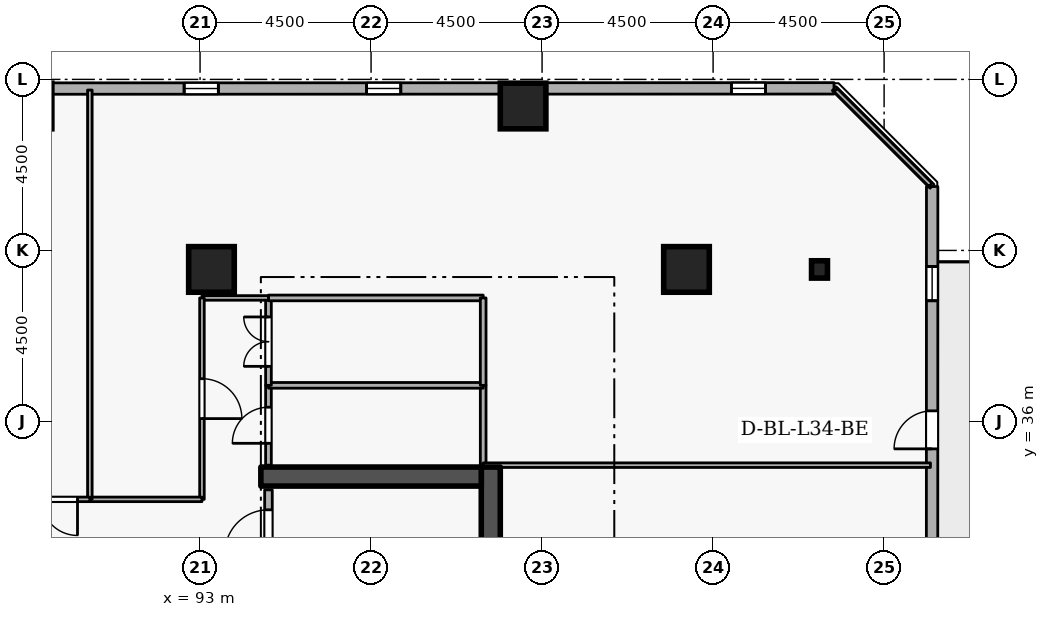
"""IFC4 building model, lengths in metres.
Left out: names, types, materials, properties, quantities, classifications, styles, units other than length and angle.
Written with IfcOpenShell. Run it as: python <this file> out.ifc"""

import sys

from ifc_helpers import new_model, si_unit, direction, frame, frame_2d, origin, origin_2d, place, context, subcontext, project, spatial, rectangle, i_section, extrude, element, fill, save


model = new_model("IFC4")
c1 = context("Model", 3, precision=1e-05, world=origin(), true_north=direction((0.0, 1.0)))
c2 = subcontext(c1, "Body", "Model", "MODEL_VIEW")
j1 = project(units=[si_unit("LENGTHUNIT", "METRE"), si_unit("PLANEANGLEUNIT", "RADIAN")], contexts=[c1])
p1 = place(None, origin())
s1 = spatial("IfcSite", under=j1, at=p1, CompositionType="ELEMENT")
p2 = place(p1, origin())
s2 = spatial("IfcBuilding", under=s1, at=p2, CompositionType="ELEMENT")
p3 = place(p2, frame((0.0, 0.0, 130.5)))
s3 = spatial("IfcBuildingStorey", under=s2, at=p3, CompositionType="ELEMENT", Elevation=130.5)
p4 = place(p3, frame((100.65, 19.2, 0.0), z_axis=(0.0, 0.0, 1.0), x_axis=(0.0, 1.0, 0.0)))
e1 = element("IfcWall", 1, at=p4, inside=s3, PredefinedType="SHEAR", context=c2, shape_type="SweptSolid", body=[
    extrude(rectangle(XDim=15.6, YDim=0.5, at=frame_2d((7.8, 0.0))), origin(), (0.0, 0.0, 1.0), 3.6),
])
p5 = place(p3, frame((94.6, 34.55, 0.0), z_axis=(0.0, 0.0, 1.0), x_axis=(1.0, 0.0, 0.0)))
e2 = element("IfcWall", 2, at=p5, inside=s3, PredefinedType="SHEAR", context=c2, shape_type="SweptSolid", body=[
    extrude(rectangle(XDim=5.8, YDim=0.5, at=frame_2d((2.9, 0.0))), origin(), (0.0, 0.0, 1.0), 3.6),
])
for number, where, z_axis, x_axis in (
    (3, (105.8, 40.0, 0.0), (0.0, 0.0, 1.0), (1.0, 0.0, 0.0)),
    (4, (101.5, 44.3, 0.0), (0.0, 0.0, 1.0), (1.0, 0.0, 0.0)),
    (5, (93.3, 40.0, 0.0), (0.0, 0.0, 1.0), (1.0, 0.0, 0.0)),
):
    element("IfcColumn", number, at=place(p3, frame(where, z_axis=z_axis, x_axis=x_axis)), inside=s3, PredefinedType="COLUMN", context=c2, shape_type="SweptSolid", body=[
        extrude(rectangle(XDim=1.2, YDim=1.2, at=origin_2d()), origin(), (0.0, 0.0, 1.0), 3.6),
    ])
p6 = place(p3, frame((109.3, 40.0, 0.0), z_axis=(0.0, 0.0, 1.0), x_axis=(1.0, 0.0, 0.0)))
e6 = element("IfcColumn", 6, at=p6, inside=s3, PredefinedType="COLUMN", context=c2, shape_type="SweptSolid", body=[
    extrude(i_section(OverallWidth=0.418, OverallDepth=0.456, WebThickness=0.042, FlangeThickness=0.067, FilletRadius=0.015, at=origin_2d()), origin(), (0.0, 0.0, 1.0), 3.6),
])
p7 = place(p3, frame((112.256, 8.576, 0.0), z_axis=(0.0, 0.0, 1.0), x_axis=(0.000268805477, 0.999999963872, 0.0)))
e7 = element("IfcWall", 7, at=p7, inside=s3, PredefinedType="STANDARD", context=c2, shape_type="SweptSolid", body=[
    extrude(rectangle(XDim=33.605, YDim=0.3, at=frame_2d((16.802, 0.0))), origin(), (0.0, 0.0, 1.0), 2.7),
])
p8 = place(p7, frame((26.702, 0.0, 0.0)))
e8 = element("IfcOpeningElement", 8, at=p8, cuts=e7, PredefinedType="OPENING", context=c2, shape_type="SweptSolid", body=[
    extrude(rectangle(XDim=1.0, YDim=2.08, at=frame_2d((0.5, 1.04))), frame((0.0, 0.16, 0.0), z_axis=(0.0, -1.0, 0.0), x_axis=(1.0, 0.0, 0.0)), (0.0, 0.0, 1.0), 0.32),
])
p9 = place(p7, frame((1.8, 0.0, 0.72)))
e9 = element("IfcOpeningElement", 9, at=p9, cuts=e7, PredefinedType="OPENING", context=c2, shape_type="SweptSolid", body=[
    extrude(rectangle(XDim=0.9, YDim=1.75, at=frame_2d((0.45, 0.875))), frame((0.0, 0.16, 0.0), z_axis=(0.0, -1.0, 0.0), x_axis=(1.0, 0.0, 0.0)), (0.0, 0.0, 1.0), 0.32),
])
p10 = place(p7, frame((6.6, 0.0, 0.72)))
e10 = element("IfcOpeningElement", 10, at=p10, cuts=e7, PredefinedType="OPENING", context=c2, shape_type="SweptSolid", body=[
    extrude(rectangle(XDim=0.9, YDim=1.75, at=frame_2d((0.45, 0.875))), frame((0.0, 0.16, 0.0), z_axis=(0.0, -1.0, 0.0), x_axis=(1.0, 0.0, 0.0)), (0.0, 0.0, 1.0), 0.32),
])
p11 = place(p7, frame((11.4, 0.0, 0.72)))
e11 = element("IfcOpeningElement", 11, at=p11, cuts=e7, PredefinedType="OPENING", context=c2, shape_type="SweptSolid", body=[
    extrude(rectangle(XDim=0.9, YDim=1.75, at=frame_2d((0.45, 0.875))), frame((0.0, 0.16, 0.0), z_axis=(0.0, -1.0, 0.0), x_axis=(1.0, 0.0, 0.0)), (0.0, 0.0, 1.0), 0.32),
])
p12 = place(p7, frame((16.2, 0.0, 0.72)))
e12 = element("IfcOpeningElement", 12, at=p12, cuts=e7, PredefinedType="OPENING", context=c2, shape_type="SweptSolid", body=[
    extrude(rectangle(XDim=0.9, YDim=1.75, at=frame_2d((0.45, 0.875))), frame((0.0, 0.16, 0.0), z_axis=(0.0, -1.0, 0.0), x_axis=(1.0, 0.0, 0.0)), (0.0, 0.0, 1.0), 0.32),
])
p13 = place(p7, frame((21.0, 0.0, 0.72)))
e13 = element("IfcOpeningElement", 13, at=p13, cuts=e7, PredefinedType="OPENING", context=c2, shape_type="SweptSolid", body=[
    extrude(rectangle(XDim=0.9, YDim=1.75, at=frame_2d((0.45, 0.875))), frame((0.0, 0.16, 0.0), z_axis=(0.0, -1.0, 0.0), x_axis=(1.0, 0.0, 0.0)), (0.0, 0.0, 1.0), 0.32),
])
p14 = place(p7, frame((30.6, 0.0, 0.72)))
e14 = element("IfcOpeningElement", 14, at=p14, cuts=e7, PredefinedType="OPENING", context=c2, shape_type="SweptSolid", body=[
    extrude(rectangle(XDim=0.9, YDim=1.75, at=frame_2d((0.45, 0.875))), frame((0.0, 0.16, 0.0), z_axis=(0.0, -1.0, 0.0), x_axis=(1.0, 0.0, 0.0)), (0.0, 0.0, 1.0), 0.32),
])
p15 = place(p3, frame((109.681, 44.765, 0.0), z_axis=(0.0, 0.0, 1.0), x_axis=(-0.999999963872, -0.000268805477, 0.0)))
e15 = element("IfcWall", 15, at=p15, inside=s3, PredefinedType="STANDARD", context=c2, shape_type="SweptSolid", body=[
    extrude(rectangle(XDim=33.605, YDim=0.3, at=frame_2d((16.802, 0.0))), origin(), (0.0, 0.0, 1.0), 2.7),
])
p16 = place(p15, frame((1.8, 0.0, 0.72)))
e16 = element("IfcOpeningElement", 16, at=p16, cuts=e15, PredefinedType="OPENING", context=c2, shape_type="SweptSolid", body=[
    extrude(rectangle(XDim=0.9, YDim=1.75, at=frame_2d((0.45, 0.875))), frame((0.0, 0.16, 0.0), z_axis=(0.0, -1.0, 0.0), x_axis=(1.0, 0.0, 0.0)), (0.0, 0.0, 1.0), 0.32),
])
p17 = place(p15, frame((11.4, 0.0, 0.72)))
e17 = element("IfcOpeningElement", 17, at=p17, cuts=e15, PredefinedType="OPENING", context=c2, shape_type="SweptSolid", body=[
    extrude(rectangle(XDim=0.9, YDim=1.75, at=frame_2d((0.45, 0.875))), frame((0.0, 0.16, 0.0), z_axis=(0.0, -1.0, 0.0), x_axis=(1.0, 0.0, 0.0)), (0.0, 0.0, 1.0), 0.32),
])
p18 = place(p15, frame((16.2, 0.0, 0.72)))
e18 = element("IfcOpeningElement", 18, at=p18, cuts=e15, PredefinedType="OPENING", context=c2, shape_type="SweptSolid", body=[
    extrude(rectangle(XDim=0.9, YDim=1.75, at=frame_2d((0.45, 0.875))), frame((0.0, 0.16, 0.0), z_axis=(0.0, -1.0, 0.0), x_axis=(1.0, 0.0, 0.0)), (0.0, 0.0, 1.0), 0.32),
])
p19 = place(p15, frame((25.8, 0.0, 0.72)))
e19 = element("IfcOpeningElement", 19, at=p19, cuts=e15, PredefinedType="OPENING", context=c2, shape_type="SweptSolid", body=[
    extrude(rectangle(XDim=0.9, YDim=1.75, at=frame_2d((0.45, 0.875))), frame((0.0, 0.16, 0.0), z_axis=(0.0, -1.0, 0.0), x_axis=(1.0, 0.0, 0.0)), (0.0, 0.0, 1.0), 0.32),
])
p20 = place(p15, frame((30.6, 0.0, 0.72)))
e20 = element("IfcOpeningElement", 20, at=p20, cuts=e15, PredefinedType="OPENING", context=c2, shape_type="SweptSolid", body=[
    extrude(rectangle(XDim=0.9, YDim=1.75, at=frame_2d((0.45, 0.875))), frame((0.0, 0.16, 0.0), z_axis=(0.0, -1.0, 0.0), x_axis=(1.0, 0.0, 0.0)), (0.0, 0.0, 1.0), 0.32),
])
p21 = place(p3, frame((94.8, 32.0, 0.0), z_axis=(0.0, 0.0, 1.0), x_axis=(0.0, 1.0, 0.0)))
e21 = element("IfcWall", 21, at=p21, inside=s3, PredefinedType="STANDARD", context=c2, shape_type="SweptSolid", body=[
    extrude(rectangle(XDim=2.2, YDim=0.2, at=frame_2d((1.1, 0.0))), origin(), (0.0, 0.0, 1.0), 3.34),
])
p22 = place(p21, frame((0.525, 0.0, 0.0)))
e22 = element("IfcOpeningElement", 22, at=p22, cuts=e21, PredefinedType="OPENING", context=c2, shape_type="SweptSolid", body=[
    extrude(rectangle(XDim=1.15, YDim=2.1, at=frame_2d((0.575, 1.05))), frame((0.0, 0.11, 0.0), z_axis=(0.0, -1.0, 0.0), x_axis=(1.0, 0.0, 0.0)), (0.0, 0.0, 1.0), 0.22),
])
p23 = place(p3, frame((100.45, 36.95, 0.0), z_axis=(0.0, 0.0, 1.0), x_axis=(0.0, -1.0, 0.0)))
e23 = element("IfcWall", 23, at=p23, inside=s3, PredefinedType="PARTITIONING", context=c2, shape_type="SweptSolid", body=[
    extrude(rectangle(XDim=2.1, YDim=0.15, at=frame_2d((1.05, 0.0))), origin(), (0.0, 0.0, 1.0), 3.34),
])
p24 = place(p3, frame((94.8, 34.85, 0.0), z_axis=(0.0, 0.0, 1.0), x_axis=(0.0, 1.0, 0.0)))
e24 = element("IfcWall", 24, at=p24, inside=s3, PredefinedType="PARTITIONING", context=c2, shape_type="SweptSolid", body=[
    extrude(rectangle(XDim=2.1, YDim=0.15, at=frame_2d((1.05, 0.0))), origin(), (0.0, 0.0, 1.0), 3.34),
])
p25 = place(p24, frame((0.575, 0.0, 0.0)))
e25 = element("IfcOpeningElement", 25, at=p25, cuts=e24, PredefinedType="OPENING", context=c2, shape_type="SweptSolid", body=[
    extrude(rectangle(XDim=0.95, YDim=2.1, at=frame_2d((0.475, 1.05))), frame((0.0, 0.085, 0.0), z_axis=(0.0, -1.0, 0.0), x_axis=(1.0, 0.0, 0.0)), (0.0, 0.0, 1.0), 0.17),
])
p26 = place(p3, frame((94.8, 36.95, 0.0), z_axis=(0.0, 0.0, 1.0), x_axis=(1.0, 0.0, 0.0)))
e26 = element("IfcWall", 26, at=p26, inside=s3, PredefinedType="PARTITIONING", context=c2, shape_type="SweptSolid", body=[
    extrude(rectangle(XDim=5.65, YDim=0.15, at=frame_2d((2.825, 0.0))), origin(), (0.0, 0.0, 1.0), 3.34),
])
p27 = place(p3, frame((94.8, 36.95, 0.0), z_axis=(0.0, 0.0, 1.0), x_axis=(0.0, 1.0, 0.0)))
e27 = element("IfcWall", 27, at=p27, inside=s3, PredefinedType="PARTITIONING", context=c2, shape_type="SweptSolid", body=[
    extrude(rectangle(XDim=2.3, YDim=0.15, at=frame_2d((1.15, 0.0))), origin(), (0.0, 0.0, 1.0), 3.34),
])
p28 = place(p27, frame((0.5, 0.0, 0.0)))
e28 = element("IfcOpeningElement", 28, at=p28, cuts=e27, PredefinedType="OPENING", context=c2, shape_type="SweptSolid", body=[
    extrude(rectangle(XDim=1.3, YDim=2.12, at=frame_2d((0.65, 1.06))), frame((0.0, 0.085, 0.0), z_axis=(0.0, -1.0, 0.0), x_axis=(1.0, 0.0, 0.0)), (0.0, 0.0, 1.0), 0.17),
])
p29 = place(p3, frame((94.8, 39.25, 0.0), z_axis=(0.0, 0.0, 1.0), x_axis=(1.0, 0.0, 0.0)))
e29 = element("IfcWall", 29, at=p29, inside=s3, PredefinedType="PARTITIONING", context=c2, shape_type="SweptSolid", body=[
    extrude(rectangle(XDim=5.65, YDim=0.15, at=frame_2d((2.825, 0.0))), origin(), (0.0, 0.0, 1.0), 3.34),
])
p30 = place(p3, frame((100.45, 39.25, 0.0), z_axis=(0.0, 0.0, 1.0), x_axis=(0.0, -1.0, 0.0)))
e30 = element("IfcWall", 30, at=p30, inside=s3, PredefinedType="PARTITIONING", context=c2, shape_type="SweptSolid", body=[
    extrude(rectangle(XDim=2.3, YDim=0.15, at=frame_2d((1.15, 0.0))), origin(), (0.0, 0.0, 1.0), 3.34),
])
p31 = place(p3, frame((94.8, 39.25, 0.0), z_axis=(0.0, 0.0, 1.0), x_axis=(-1.0, 0.0, 0.0)))
e31 = element("IfcWall", 31, at=p31, inside=s3, PredefinedType="PARTITIONING", context=c2, shape_type="SweptSolid", body=[
    extrude(rectangle(XDim=1.75, YDim=0.12, at=frame_2d((0.875, 0.0))), origin(), (0.0, 0.0, 1.0), 3.34),
])
p32 = place(p3, frame((93.05, 39.25, 0.0), z_axis=(0.0, 0.0, 1.0), x_axis=(0.0, -1.0, 0.0)))
e32 = element("IfcWall", 32, at=p32, inside=s3, PredefinedType="PARTITIONING", context=c2, shape_type="SweptSolid", body=[
    extrude(rectangle(XDim=5.3, YDim=0.12, at=frame_2d((2.65, 0.0))), origin(), (0.0, 0.0, 1.0), 3.34),
])
p33 = place(p32, frame((2.125, 0.0, 0.0)))
e33 = element("IfcOpeningElement", 33, at=p33, cuts=e32, PredefinedType="OPENING", context=c2, shape_type="SweptSolid", body=[
    extrude(rectangle(XDim=1.05, YDim=2.1, at=frame_2d((0.525, 1.05))), frame((0.0, 0.07, 0.0), z_axis=(0.0, -1.0, 0.0), x_axis=(1.0, 0.0, 0.0)), (0.0, 0.0, 1.0), 0.14),
])
p34 = place(p3, frame((93.05, 33.95, 0.0), z_axis=(0.0, 0.0, 1.0), x_axis=(-1.0, 0.0, 0.0)))
e34 = element("IfcWall", 34, at=p34, inside=s3, PredefinedType="PARTITIONING", context=c2, shape_type="SweptSolid", body=[
    extrude(rectangle(XDim=2.95, YDim=0.12, at=frame_2d((1.475, 0.0))), origin(), (0.0, 0.0, 1.0), 3.34),
])
p35 = place(p3, frame((90.1, 33.95, 0.0), z_axis=(0.0, 0.0, 1.0), x_axis=(0.0, 1.0, 0.0)))
e35 = element("IfcWall", 35, at=p35, inside=s3, PredefinedType="PARTITIONING", context=c2, shape_type="SweptSolid", body=[
    extrude(rectangle(XDim=10.77, YDim=0.12, at=frame_2d((5.385, 0.0))), origin(), (0.0, 0.0, 1.0), 3.34),
])
p36 = place(p3, frame((109.725, 44.72, 0.0), z_axis=(0.0, 0.0, 1.0), x_axis=(0.707106781187, -0.707106781187, 0.0)))
e36 = element("IfcWall", 36, at=p36, inside=s3, PredefinedType="PARTITIONING", context=c2, shape_type="SweptSolid", body=[
    extrude(rectangle(XDim=3.528, YDim=0.12, at=frame_2d((1.764, 0.0))), origin(), (0.0, 0.0, 1.0), 3.34),
])
p37 = place(p3, frame((112.22, 34.85, 0.0), z_axis=(0.0, 0.0, 1.0), x_axis=(-1.0, 0.0, 0.0)))
e37 = element("IfcWall", 37, at=p37, inside=s3, PredefinedType="PARTITIONING", context=c2, shape_type="SweptSolid", body=[
    extrude(rectangle(XDim=11.77, YDim=0.12, at=frame_2d((5.885, 0.0))), origin(), (0.0, 0.0, 1.0), 2.545),
])
p38 = place(p3, frame((90.1, 33.95, 0.0), z_axis=(0.0, 0.0, 1.0), x_axis=(-1.0, 0.0, 0.0)))
e38 = element("IfcWall", 38, at=p38, inside=s3, PredefinedType="PARTITIONING", context=c2, shape_type="SweptSolid", body=[
    extrude(rectangle(XDim=1.6, YDim=0.12, at=frame_2d((0.8, 0.0))), origin(), (0.0, 0.0, 1.0), 3.34),
])
p39 = place(p38, frame((0.325, 0.0, 0.0)))
e39 = element("IfcOpeningElement", 39, at=p39, cuts=e38, PredefinedType="OPENING", context=c2, shape_type="SweptSolid", body=[
    extrude(rectangle(XDim=0.95, YDim=2.1, at=frame_2d((0.475, 1.05))), frame((0.0, 0.07, 0.0), z_axis=(0.0, -1.0, 0.0), x_axis=(1.0, 0.0, 0.0)), (0.0, 0.0, 1.0), 0.14),
])
p40 = place(p8, origin())
e40 = element("IfcDoor", 40, at=p40, inside=s3, OperationType="SINGLE_SWING_LEFT", PredefinedType="DOOR", context=c2, shape_type="SweptSolid", body=[
    extrude(rectangle(XDim=1.0, YDim=2.08, at=frame_2d((0.5, 1.04))), frame((0.0, 0.025, 0.0), z_axis=(0.0, -1.0, 0.0), x_axis=(1.0, 0.0, 0.0)), (0.0, 0.0, 1.0), 0.05),
])
fill(e8, e40)
p41 = place(p14, origin())
e41 = element("IfcWindow", 41, at=p41, inside=s3, PartitioningType="SINGLE_PANEL", PredefinedType="WINDOW", context=c2, shape_type="SweptSolid", body=[
    extrude(rectangle(XDim=0.9, YDim=1.75, at=frame_2d((0.45, 0.875))), frame((0.0, 0.03, 0.0), z_axis=(0.0, -1.0, 0.0), x_axis=(1.0, 0.0, 0.0)), (0.0, 0.0, 1.0), 0.06),
])
fill(e14, e41)
p42 = place(p16, origin())
e42 = element("IfcWindow", 42, at=p42, inside=s3, PartitioningType="SINGLE_PANEL", PredefinedType="WINDOW", context=c2, shape_type="SweptSolid", body=[
    extrude(rectangle(XDim=0.9, YDim=1.75, at=frame_2d((0.45, 0.875))), frame((0.0, 0.03, 0.0), z_axis=(0.0, -1.0, 0.0), x_axis=(1.0, 0.0, 0.0)), (0.0, 0.0, 1.0), 0.06),
])
fill(e16, e42)
p43 = place(p17, origin())
e43 = element("IfcWindow", 43, at=p43, inside=s3, PartitioningType="SINGLE_PANEL", PredefinedType="WINDOW", context=c2, shape_type="SweptSolid", body=[
    extrude(rectangle(XDim=0.9, YDim=1.75, at=frame_2d((0.45, 0.875))), frame((0.0, 0.03, 0.0), z_axis=(0.0, -1.0, 0.0), x_axis=(1.0, 0.0, 0.0)), (0.0, 0.0, 1.0), 0.06),
])
fill(e17, e43)
p44 = place(p18, origin())
e44 = element("IfcWindow", 44, at=p44, inside=s3, PartitioningType="SINGLE_PANEL", PredefinedType="WINDOW", context=c2, shape_type="SweptSolid", body=[
    extrude(rectangle(XDim=0.9, YDim=1.75, at=frame_2d((0.45, 0.875))), frame((0.0, 0.03, 0.0), z_axis=(0.0, -1.0, 0.0), x_axis=(1.0, 0.0, 0.0)), (0.0, 0.0, 1.0), 0.06),
])
fill(e18, e44)
p45 = place(p22, origin())
e45 = element("IfcDoor", 45, at=p45, inside=s3, OperationType="SINGLE_SWING_LEFT", PredefinedType="DOOR", context=c2, shape_type="SweptSolid", body=[
    extrude(rectangle(XDim=1.15, YDim=2.1, at=frame_2d((0.575, 1.05))), frame((0.0, 0.025, 0.0), z_axis=(0.0, -1.0, 0.0), x_axis=(1.0, 0.0, 0.0)), (0.0, 0.0, 1.0), 0.05),
])
fill(e22, e45)
p46 = place(p25, origin())
e46 = element("IfcDoor", 46, at=p46, inside=s3, OperationType="SINGLE_SWING_LEFT", PredefinedType="DOOR", context=c2, shape_type="SweptSolid", body=[
    extrude(rectangle(XDim=0.95, YDim=2.1, at=frame_2d((0.475, 1.05))), frame((0.0, 0.025, 0.0), z_axis=(0.0, -1.0, 0.0), x_axis=(1.0, 0.0, 0.0)), (0.0, 0.0, 1.0), 0.05),
])
fill(e25, e46)
p47 = place(p28, origin())
e47 = element("IfcDoor", 47, at=p47, inside=s3, OperationType="DOUBLE_DOOR_SINGLE_SWING", PredefinedType="DOOR", context=c2, shape_type="SweptSolid", body=[
    extrude(rectangle(XDim=1.3, YDim=2.12, at=frame_2d((0.65, 1.06))), frame((0.0, 0.025, 0.0), z_axis=(0.0, -1.0, 0.0), x_axis=(1.0, 0.0, 0.0)), (0.0, 0.0, 1.0), 0.05),
])
fill(e28, e47)
p48 = place(p33, origin())
e48 = element("IfcDoor", 48, at=p48, inside=s3, OperationType="SINGLE_SWING_RIGHT", PredefinedType="DOOR", context=c2, shape_type="SweptSolid", body=[
    extrude(rectangle(XDim=1.05, YDim=2.1, at=frame_2d((0.525, 1.05))), frame((0.0, 0.025, 0.0), z_axis=(0.0, -1.0, 0.0), x_axis=(1.0, 0.0, 0.0)), (0.0, 0.0, 1.0), 0.05),
])
fill(e33, e48)
p49 = place(p39, origin())
e49 = element("IfcDoor", 49, at=p49, inside=s3, OperationType="SINGLE_SWING_LEFT", PredefinedType="DOOR", context=c2, shape_type="SweptSolid", body=[
    extrude(rectangle(XDim=0.95, YDim=2.1, at=frame_2d((0.475, 1.05))), frame((0.0, 0.025, 0.0), z_axis=(0.0, -1.0, 0.0), x_axis=(1.0, 0.0, 0.0)), (0.0, 0.0, 1.0), 0.05),
])
fill(e39, e49)
save(model, sys.argv[1])
